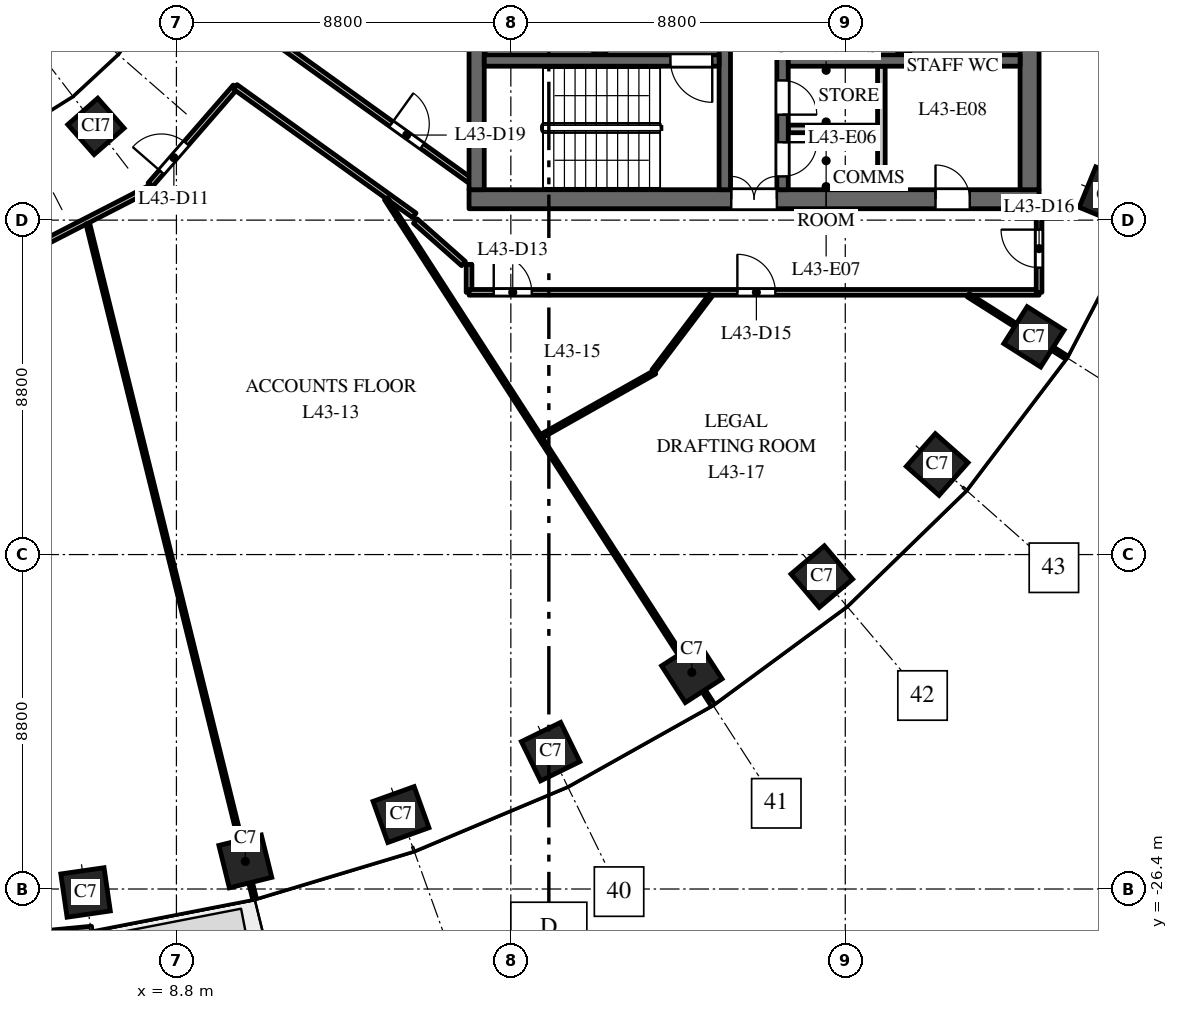
"""IFC4 building model, lengths in metres.
Left out: names, types, materials, properties, quantities, classifications, styles, units other than length and angle.
Written with IfcOpenShell. Run it as: python <this file> out.ifc"""

import sys

from ifc_helpers import new_model, si_unit, direction, frame, frame_2d, origin, origin_2d, place, context, subcontext, project, spatial, rectangle, extrude, element, fill, save


model = new_model("IFC4")
c1 = context("Model", 3, precision=1e-05, world=origin(), true_north=direction((0.0, 1.0)))
c2 = subcontext(c1, "Body", "Model", "MODEL_VIEW")
j1 = project(units=[si_unit("LENGTHUNIT", "METRE"), si_unit("PLANEANGLEUNIT", "RADIAN")], contexts=[c1])
p1 = place(None, origin())
s1 = spatial("IfcSite", under=j1, at=p1, CompositionType="ELEMENT")
p2 = place(p1, origin())
s2 = spatial("IfcBuilding", under=s1, at=p2, CompositionType="ELEMENT")
p3 = place(p2, frame((0.0, 0.0, 186.0)))
s3 = spatial("IfcBuildingStorey", under=s2, at=p3, CompositionType="ELEMENT", Elevation=186.0)
for number, where, z_axis, x_axis in (
    (1, (6.409, -26.491, 0.0), (0.0, 0.0, 1.0), (0.99, 0.143, 0.0)),
    (2, (10.613, -25.674, 0.0), (0.0, 0.0, 1.0), (0.971, 0.24, 0.0)),
    (3, (14.709, -24.441, 0.0), (0.0, 0.0, 1.0), (0.941, 0.338, 0.0)),
    (4, (18.646, -22.785, 0.0), (0.0, 0.0, 1.0), (0.898, 0.439, 0.0)),
    (5, (22.362, -20.7, 0.0), (0.0, 0.0, 1.0), (0.84, 0.542, 0.0)),
    (6, (25.783, -18.18, 0.0), (0.0, 0.0, 1.0), (0.763, 0.646, 0.0)),
    (7, (28.819, -15.23, 0.0), (0.0, 0.0, 1.0), (0.663, 0.749, 0.0)),
    (8, (31.365, -11.871, 0.0), (0.0, 0.0, 1.0), (0.535, 0.845, 0.0)),
    (9, (33.305, -8.149, 0.0), (0.0, 0.0, 1.0), (0.379, 0.925, 0.0)),
):
    element("IfcColumn", number, at=place(p3, frame(where, z_axis=z_axis, x_axis=x_axis)), inside=s3, PredefinedType="COLUMN", context=c2, shape_type="SweptSolid", body=[
        extrude(rectangle(XDim=1.15, YDim=1.15, at=origin_2d()), origin(), (0.0, 0.0, 1.0), 4.0),
    ])
p4 = place(p3, frame((6.682, -6.334, 0.0), z_axis=(0.0, 0.0, 1.0), x_axis=(0.75102249095, 0.660276622399, 0.0)))
e10 = element("IfcColumn", 10, at=p4, inside=s3, PredefinedType="COLUMN", context=c2, shape_type="SweptSolid", body=[
    extrude(rectangle(XDim=1.05, YDim=1.05, at=origin_2d()), origin(), (0.0, 0.0, 1.0), 4.0),
])
p5 = place(p3, frame((16.5, -8.25, 0.0), z_axis=(0.0, 0.0, 1.0), x_axis=(1.0, 0.0, 0.0)))
e11 = element("IfcWall", 11, at=p5, inside=s3, PredefinedType="SHEAR", context=c2, shape_type="SweptSolid", body=[
    extrude(rectangle(XDim=15.0, YDim=0.5, at=frame_2d((7.5, 0.0))), origin(), (0.0, 0.0, 1.0), 3.7),
])
p6 = place(p5, frame((6.9, 0.0, 0.0)))
e12 = element("IfcOpeningElement", 12, at=p6, cuts=e11, PredefinedType="OPENING", context=c2, shape_type="SweptSolid", body=[
    extrude(rectangle(XDim=1.2, YDim=2.1, at=frame_2d((0.6, 1.05))), frame((0.0, 0.26, 0.0), z_axis=(0.0, -1.0, 0.0), x_axis=(1.0, 0.0, 0.0)), (0.0, 0.0, 1.0), 0.52),
])
p7 = place(p5, frame((12.275, 0.0, 0.0)))
e13 = element("IfcOpeningElement", 13, at=p7, cuts=e11, PredefinedType="OPENING", context=c2, shape_type="SweptSolid", body=[
    extrude(rectangle(XDim=0.9, YDim=2.1, at=frame_2d((0.45, 1.05))), frame((0.0, 0.26, 0.0), z_axis=(0.0, -1.0, 0.0), x_axis=(1.0, 0.0, 0.0)), (0.0, 0.0, 1.0), 0.52),
])
p8 = place(p3, frame((27.95, -4.45, 0.0), z_axis=(0.0, 0.0, 1.0), x_axis=(0.0, 1.0, 0.0)))
e14 = element("IfcWall", 14, at=p8, inside=s3, PredefinedType="SHEAR", context=c2, shape_type="SweptSolid", body=[
    extrude(rectangle(XDim=8.9, YDim=0.3, at=frame_2d((4.45, 0.0))), origin(), (0.0, 0.0, 1.0), 3.7),
])
p9 = place(p3, frame((19.95, -4.45, 0.0), z_axis=(0.0, 0.0, 1.0), x_axis=(0.0, 1.0, 0.0)))
e15 = element("IfcWall", 15, at=p9, inside=s3, PredefinedType="SHEAR", context=c2, shape_type="SweptSolid", body=[
    extrude(rectangle(XDim=8.9, YDim=0.3, at=frame_2d((4.45, 0.0))), origin(), (0.0, 0.0, 1.0), 3.7),
])
p10 = place(p9, frame((0.775, 0.0, 0.0)))
e16 = element("IfcOpeningElement", 16, at=p10, cuts=e15, PredefinedType="OPENING", context=c2, shape_type="SweptSolid", body=[
    extrude(rectangle(XDim=1.2, YDim=2.1, at=frame_2d((0.6, 1.05))), frame((0.0, 0.16, 0.0), z_axis=(0.0, -1.0, 0.0), x_axis=(1.0, 0.0, 0.0)), (0.0, 0.0, 1.0), 0.32),
])
p11 = place(p9, frame((4.675, 0.0, 0.0)))
e17 = element("IfcOpeningElement", 17, at=p11, cuts=e15, PredefinedType="OPENING", context=c2, shape_type="SweptSolid", body=[
    extrude(rectangle(XDim=1.1, YDim=2.1, at=frame_2d((0.55, 1.05))), frame((0.0, 0.16, 0.0), z_axis=(0.0, -1.0, 0.0), x_axis=(1.0, 0.0, 0.0)), (0.0, 0.0, 1.0), 0.32),
])
p12 = place(p9, frame((7.25, 0.0, 0.0)))
e18 = element("IfcOpeningElement", 18, at=p12, cuts=e15, PredefinedType="OPENING", context=c2, shape_type="SweptSolid", body=[
    extrude(rectangle(XDim=1.1, YDim=2.1, at=frame_2d((0.55, 1.05))), frame((0.0, 0.16, 0.0), z_axis=(0.0, -1.0, 0.0), x_axis=(1.0, 0.0, 0.0)), (0.0, 0.0, 1.0), 0.32),
])
p13 = place(p3, frame((24.75, -8.0, 0.0), z_axis=(0.0, 0.0, 1.0), x_axis=(0.0, 1.0, 0.0)))
e19 = element("IfcWall", 19, at=p13, inside=s3, PredefinedType="SHEAR", context=c2, shape_type="SweptSolid", body=[
    extrude(rectangle(XDim=16.0, YDim=0.3, at=frame_2d((8.0, 0.0))), origin(), (0.0, 0.0, 1.0), 3.7),
])
p14 = place(p13, frame((4.425, 0.0, 0.0)))
e20 = element("IfcOpeningElement", 20, at=p14, cuts=e19, PredefinedType="OPENING", context=c2, shape_type="SweptSolid", body=[
    extrude(rectangle(XDim=1.1, YDim=2.1, at=frame_2d((0.55, 1.05))), frame((0.0, 0.16, 0.0), z_axis=(0.0, -1.0, 0.0), x_axis=(1.0, 0.0, 0.0)), (0.0, 0.0, 1.0), 0.32),
])
p15 = place(p13, frame((7.45, 0.0, 0.0)))
e21 = element("IfcOpeningElement", 21, at=p15, cuts=e19, PredefinedType="OPENING", context=c2, shape_type="SweptSolid", body=[
    extrude(rectangle(XDim=1.1, YDim=2.1, at=frame_2d((0.55, 1.05))), frame((0.0, 0.16, 0.0), z_axis=(0.0, -1.0, 0.0), x_axis=(1.0, 0.0, 0.0)), (0.0, 0.0, 1.0), 0.32),
])
p16 = place(p13, frame((10.475, 0.0, 0.0)))
e22 = element("IfcOpeningElement", 22, at=p16, cuts=e19, PredefinedType="OPENING", context=c2, shape_type="SweptSolid", body=[
    extrude(rectangle(XDim=1.1, YDim=2.1, at=frame_2d((0.55, 1.05))), frame((0.0, 0.16, 0.0), z_axis=(0.0, -1.0, 0.0), x_axis=(1.0, 0.0, 0.0)), (0.0, 0.0, 1.0), 0.32),
])
p17 = place(p13, frame((13.75, 0.0, 0.0)))
e23 = element("IfcOpeningElement", 23, at=p17, cuts=e19, PredefinedType="OPENING", context=c2, shape_type="SweptSolid", body=[
    extrude(rectangle(XDim=0.9, YDim=2.1, at=frame_2d((0.45, 1.05))), frame((0.0, 0.16, 0.0), z_axis=(0.0, -1.0, 0.0), x_axis=(1.0, 0.0, 0.0)), (0.0, 0.0, 1.0), 0.32),
])
p18 = place(p13, frame((1.975, 0.0, 0.0)))
e24 = element("IfcOpeningElement", 24, at=p18, cuts=e19, PredefinedType="OPENING", context=c2, shape_type="SweptSolid", body=[
    extrude(rectangle(XDim=0.9, YDim=2.1, at=frame_2d((0.45, 1.05))), frame((0.0, 0.16, 0.0), z_axis=(0.0, -1.0, 0.0), x_axis=(1.0, 0.0, 0.0)), (0.0, 0.0, 1.0), 0.32),
])
p19 = place(p13, frame((0.35, 0.0, 0.0)))
e25 = element("IfcOpeningElement", 25, at=p19, cuts=e19, PredefinedType="OPENING", context=c2, shape_type="SweptSolid", body=[
    extrude(rectangle(XDim=0.9, YDim=2.1, at=frame_2d((0.45, 1.05))), frame((0.0, 0.16, 0.0), z_axis=(0.0, -1.0, 0.0), x_axis=(1.0, 0.0, 0.0)), (0.0, 0.0, 1.0), 0.32),
])
p20 = place(p3, frame((16.7, -8.0, 0.0), z_axis=(0.0, 0.0, 1.0), x_axis=(0.0, 1.0, 0.0)))
e26 = element("IfcWall", 26, at=p20, inside=s3, PredefinedType="SHEAR", context=c2, shape_type="SweptSolid", body=[
    extrude(rectangle(XDim=16.0, YDim=0.4, at=frame_2d((8.0, 0.0))), origin(), (0.0, 0.0, 1.0), 3.7),
])
p21 = place(p3, frame((31.25, -8.0, 0.0), z_axis=(0.0, 0.0, 1.0), x_axis=(0.0, 1.0, 0.0)))
e27 = element("IfcWall", 27, at=p21, inside=s3, PredefinedType="SHEAR", context=c2, shape_type="SweptSolid", body=[
    extrude(rectangle(XDim=16.0, YDim=0.5, at=frame_2d((8.0, 0.0))), origin(), (0.0, 0.0, 1.0), 3.7),
])
p22 = place(p3, frame((27.35, -8.0, 0.0), z_axis=(0.0, 0.0, 1.0), x_axis=(0.0, 1.0, 0.0)))
e28 = element("IfcWall", 28, at=p22, inside=s3, PredefinedType="PARTITIONING", context=c2, shape_type="SweptSolid", body=[
    extrude(rectangle(XDim=3.25, YDim=0.2, at=frame_2d((1.625, 0.0))), origin(), (0.0, 0.0, 1.0), 3.7),
])
p23 = place(p3, frame((24.9, -6.4, 0.0), z_axis=(0.0, 0.0, 1.0), x_axis=(1.0, 0.0, 0.0)))
e29 = element("IfcWall", 29, at=p23, inside=s3, PredefinedType="PARTITIONING", context=c2, shape_type="SweptSolid", body=[
    extrude(rectangle(XDim=2.35, YDim=0.2, at=frame_2d((1.175, 0.0))), origin(), (0.0, 0.0, 1.0), 3.7),
])
p24 = place(p3, frame((24.9, -4.6, 0.0), z_axis=(0.0, 0.0, 1.0), x_axis=(1.0, 0.0, 0.0)))
e30 = element("IfcWall", 30, at=p24, inside=s3, PredefinedType="SHEAR", context=c2, shape_type="SweptSolid", body=[
    extrude(rectangle(XDim=6.1, YDim=0.3, at=frame_2d((3.05, 0.0))), origin(), (0.0, 0.0, 1.0), 3.7),
])
p25 = place(p3, frame((23.23, -8.0, 0.0), z_axis=(0.0, 0.0, 1.0), x_axis=(0.0, 1.0, 0.0)))
e31 = element("IfcWall", 31, at=p25, inside=s3, PredefinedType="SHEAR", context=c2, shape_type="SweptSolid", body=[
    extrude(rectangle(XDim=7.875, YDim=0.3, at=frame_2d((3.938, 0.0))), origin(), (0.0, 0.0, 1.0), 3.7),
])
p26 = place(p25, frame((5.15, 0.0, 0.0)))
e32 = element("IfcOpeningElement", 32, at=p26, cuts=e31, PredefinedType="OPENING", context=c2, shape_type="SweptSolid", body=[
    extrude(rectangle(XDim=1.1, YDim=2.1, at=frame_2d((0.55, 1.05))), frame((0.0, 0.16, 0.0), z_axis=(0.0, -1.0, 0.0), x_axis=(1.0, 0.0, 0.0)), (0.0, 0.0, 1.0), 0.32),
])
p27 = place(p3, frame((16.9, -4.6, 0.0), z_axis=(0.0, 0.0, 1.0), x_axis=(1.0, 0.0, 0.0)))
e33 = element("IfcWall", 33, at=p27, inside=s3, PredefinedType="SHEAR", context=c2, shape_type="SweptSolid", body=[
    extrude(rectangle(XDim=6.18, YDim=0.3, at=frame_2d((3.09, 0.0))), origin(), (0.0, 0.0, 1.0), 3.7),
])
p28 = place(p27, frame((4.9, 0.0, 0.0)))
e34 = element("IfcOpeningElement", 34, at=p28, cuts=e33, PredefinedType="OPENING", context=c2, shape_type="SweptSolid", body=[
    extrude(rectangle(XDim=1.1, YDim=2.1, at=frame_2d((0.55, 1.05))), frame((0.0, 0.16, 0.0), z_axis=(0.0, -1.0, 0.0), x_axis=(1.0, 0.0, 0.0)), (0.0, 0.0, 1.0), 0.32),
])
p29 = place(p3, frame((2.166, -27.875, 0.0), z_axis=(0.0, 0.0, 1.0), x_axis=(0.995473879823, 0.095035543824, 0.0)))
e35 = element("IfcWall", 35, at=p29, inside=s3, PredefinedType="STANDARD", context=c2, shape_type="SweptSolid", body=[
    extrude(rectangle(XDim=4.426, YDim=0.15, at=frame_2d((2.213, 0.0))), origin(), (0.0, 0.0, 1.0), 3.7),
])
p30 = place(p29, frame((1.713, 0.0, 0.0)))
e36 = element("IfcOpeningElement", 36, at=p30, cuts=e35, PredefinedType="OPENING", context=c2, shape_type="SweptSolid", body=[
    extrude(rectangle(XDim=1.0, YDim=2.4, at=frame_2d((0.5, 1.2))), frame((0.0, 0.085, 0.0), z_axis=(0.0, -1.0, 0.0), x_axis=(1.0, 0.0, 0.0)), (0.0, 0.0, 1.0), 0.17),
])
p31 = place(p3, frame((4.337, -9.896, 0.0), z_axis=(0.0, 0.0, 1.0), x_axis=(0.889382211946, 0.457164391739, 0.0)))
e37 = element("IfcWall", 37, at=p31, inside=s3, PredefinedType="PARTITIONING", context=c2, shape_type="SweptSolid", body=[
    extrude(rectangle(XDim=4.296, YDim=0.15, at=frame_2d((2.148, 0.0))), origin(), (0.0, 0.0, 1.0), 2.85),
])
p32 = place(p3, frame((6.467, -8.889, 0.0), z_axis=(0.0, 0.0, 1.0), x_axis=(0.239792865419, -0.970824073504, 0.0)))
e38 = element("IfcWall", 38, at=p32, inside=s3, PredefinedType="PARTITIONING", context=c2, shape_type="SweptSolid", body=[
    extrude(rectangle(XDim=18.291, YDim=0.1, at=frame_2d((9.146, 0.0))), origin(), (0.0, 0.0, 1.0), 2.85),
])
p33 = place(p3, frame((8.111, -7.871, 0.0), z_axis=(0.0, 0.0, 1.0), x_axis=(0.656293818527, 0.754505416656, 0.0)))
e39 = element("IfcWall", 39, at=p33, inside=s3, PredefinedType="PARTITIONING", context=c2, shape_type="SweptSolid", body=[
    extrude(rectangle(XDim=3.413, YDim=0.15, at=frame_2d((1.707, 0.0))), origin(), (0.0, 0.0, 1.0), 2.75),
])
p34 = place(p33, frame((0.447, 0.0, 0.0)))
e40 = element("IfcOpeningElement", 40, at=p34, cuts=e39, PredefinedType="OPENING", context=c2, shape_type="SweptSolid", body=[
    extrude(rectangle(XDim=1.0, YDim=2.1, at=frame_2d((0.5, 1.05))), frame((0.0, 0.085, 0.0), z_axis=(0.0, -1.0, 0.0), x_axis=(1.0, 0.0, 0.0)), (0.0, 0.0, 1.0), 0.17),
])
p35 = place(p3, frame((10.351, -5.296, 0.0), z_axis=(0.0, 0.0, 1.0), x_axis=(0.812494026232, -0.582969516645, 0.0)))
e41 = element("IfcWall", 41, at=p35, inside=s3, PredefinedType="PARTITIONING", context=c2, shape_type="SweptSolid", body=[
    extrude(rectangle(XDim=5.798, YDim=0.15, at=frame_2d((2.899, 0.0))), origin(), (0.0, 0.0, 1.0), 2.75),
])
p36 = place(p3, frame((11.203, -3.938, 0.0), z_axis=(0.0, 0.0, 1.0), x_axis=(0.812471543061, -0.583000850528, 0.0)))
e42 = element("IfcWall", 42, at=p36, inside=s3, PredefinedType="PARTITIONING", context=c2, shape_type="SweptSolid", body=[
    extrude(rectangle(XDim=6.52, YDim=0.15, at=frame_2d((3.26, 0.0))), origin(), (0.0, 0.0, 1.0), 3.7),
])
p37 = place(p36, frame((4.0, 0.0, 0.0)))
e43 = element("IfcOpeningElement", 43, at=p37, cuts=e42, PredefinedType="OPENING", context=c2, shape_type="SweptSolid", body=[
    extrude(rectangle(XDim=1.0, YDim=2.1, at=frame_2d((0.5, 1.05))), frame((0.0, 0.085, 0.0), z_axis=(0.0, -1.0, 0.0), x_axis=(1.0, 0.0, 0.0)), (0.0, 0.0, 1.0), 0.17),
])
p38 = place(p3, frame((14.317, -8.236, 0.0), z_axis=(0.0, 0.0, 1.0), x_axis=(0.542334368531, -0.840162741801, 0.0)))
e44 = element("IfcWall", 44, at=p38, inside=s3, PredefinedType="PARTITIONING", context=c2, shape_type="SweptSolid", body=[
    extrude(rectangle(XDim=15.837, YDim=0.1, at=frame_2d((7.919, 0.0))), origin(), (0.0, 0.0, 1.0), 3.7),
])
p39 = place(p3, frame((16.5, -10.7, 0.0), z_axis=(0.0, 0.0, 1.0), x_axis=(0.0, 1.0, 0.0)))
e45 = element("IfcWall", 45, at=p39, inside=s3, PredefinedType="PARTITIONING", context=c2, shape_type="SweptSolid", body=[
    extrude(rectangle(XDim=0.736, YDim=0.15, at=frame_2d((0.368, 0.0))), origin(), (0.0, 0.0, 1.0), 3.7),
])
p40 = place(p3, frame((16.5, -10.7, 0.0), z_axis=(0.0, 0.0, 1.0), x_axis=(1.0, 0.0, 0.0)))
e46 = element("IfcWall", 46, at=p40, inside=s3, PredefinedType="PARTITIONING", context=c2, shape_type="SweptSolid", body=[
    extrude(rectangle(XDim=15.0, YDim=0.15, at=frame_2d((7.5, 0.0))), origin(), (0.0, 0.0, 1.0), 2.75),
])
p41 = place(p40, frame((0.65, 0.0, 0.0)))
e47 = element("IfcOpeningElement", 47, at=p41, cuts=e46, PredefinedType="OPENING", context=c2, shape_type="SweptSolid", body=[
    extrude(rectangle(XDim=1.0, YDim=2.1, at=frame_2d((0.5, 1.05))), frame((0.0, 0.085, 0.0), z_axis=(0.0, -1.0, 0.0), x_axis=(1.0, 0.0, 0.0)), (0.0, 0.0, 1.0), 0.17),
])
p42 = place(p40, frame((7.061, 0.0, 0.0)))
e48 = element("IfcOpeningElement", 48, at=p42, cuts=e46, PredefinedType="OPENING", context=c2, shape_type="SweptSolid", body=[
    extrude(rectangle(XDim=1.0, YDim=2.1, at=frame_2d((0.5, 1.05))), frame((0.0, 0.085, 0.0), z_axis=(0.0, -1.0, 0.0), x_axis=(1.0, 0.0, 0.0)), (0.0, 0.0, 1.0), 0.17),
])
p43 = place(p3, frame((18.409, -14.482, 0.0), z_axis=(0.0, 0.0, 1.0), x_axis=(0.871167200766, 0.490986464487, 0.0)))
e49 = element("IfcWall", 49, at=p43, inside=s3, PredefinedType="PARTITIONING", context=c2, shape_type="SweptSolid", body=[
    extrude(rectangle(XDim=3.419, YDim=0.1, at=frame_2d((1.71, 0.0))), origin(), (0.0, 0.0, 1.0), 3.7),
])
p44 = place(p3, frame((21.355, -12.765, 0.0), z_axis=(0.0, 0.0, 1.0), x_axis=(0.603287715996, 0.797523624558, 0.0)))
e50 = element("IfcWall", 50, at=p44, inside=s3, PredefinedType="PARTITIONING", context=c2, shape_type="SweptSolid", body=[
    extrude(rectangle(XDim=2.491, YDim=0.1, at=frame_2d((1.246, 0.0))), origin(), (0.0, 0.0, 1.0), 2.75),
])
p45 = place(p3, frame((29.637, -10.777, 0.0), z_axis=(0.0, 0.0, 1.0), x_axis=(0.844810627195, -0.535065420467, 0.0)))
e51 = element("IfcWall", 51, at=p45, inside=s3, PredefinedType="PARTITIONING", context=c2, shape_type="SweptSolid", body=[
    extrude(rectangle(XDim=3.048, YDim=0.1, at=frame_2d((1.524, 0.0))), origin(), (0.0, 0.0, 1.0), 2.9),
])
p46 = place(p3, frame((31.5, -10.7, 0.0), z_axis=(0.0, 0.0, 1.0), x_axis=(0.0, 1.0, 0.0)))
e52 = element("IfcWall", 52, at=p46, inside=s3, PredefinedType="PARTITIONING", context=c2, shape_type="SweptSolid", body=[
    extrude(rectangle(XDim=2.2, YDim=0.15, at=frame_2d((1.1, 0.0))), origin(), (0.0, 0.0, 1.0), 2.9),
])
p47 = place(p46, frame((0.65, 0.0, 0.0)))
e53 = element("IfcOpeningElement", 53, at=p47, cuts=e52, PredefinedType="OPENING", context=c2, shape_type="SweptSolid", body=[
    extrude(rectangle(XDim=1.0, YDim=2.1, at=frame_2d((0.5, 1.05))), frame((0.0, 0.085, 0.0), z_axis=(0.0, -1.0, 0.0), x_axis=(1.0, 0.0, 0.0)), (0.0, 0.0, 1.0), 0.17),
])
p48 = place(p3, frame((16.352, -9.942, 0.0), z_axis=(0.0, 0.0, 1.0), x_axis=(-0.749107006374, 0.662449011624, 0.0)))
e54 = element("IfcWall", 54, at=p48, inside=s3, PredefinedType="PARTITIONING", context=c2, shape_type="SweptSolid", body=[
    extrude(rectangle(XDim=1.688, YDim=0.15, at=frame_2d((0.844, 0.0))), origin(), (0.0, 0.0, 1.0), 3.7),
])
p49 = place(p28, origin())
e55 = element("IfcDoor", 55, at=p49, inside=s3, OperationType="SINGLE_SWING_RIGHT", PredefinedType="DOOR", context=c2, shape_type="SweptSolid", body=[
    extrude(rectangle(XDim=1.1, YDim=2.1, at=frame_2d((0.55, 1.05))), frame((0.0, 0.025, 0.0), z_axis=(0.0, -1.0, 0.0), x_axis=(1.0, 0.0, 0.0)), (0.0, 0.0, 1.0), 0.05),
])
fill(e34, e55)
p50 = place(p6, origin())
e56 = element("IfcDoor", 56, at=p50, inside=s3, OperationType="DOUBLE_DOOR_DOUBLE_SWING", PredefinedType="DOOR", context=c2, shape_type="SweptSolid", body=[
    extrude(rectangle(XDim=1.2, YDim=2.1, at=frame_2d((0.6, 1.05))), frame((0.0, 0.025, 0.0), z_axis=(0.0, -1.0, 0.0), x_axis=(1.0, 0.0, 0.0)), (0.0, 0.0, 1.0), 0.05),
])
fill(e12, e56)
p51 = place(p18, origin())
e57 = element("IfcDoor", 57, at=p51, inside=s3, OperationType="SINGLE_SWING_LEFT", PredefinedType="DOOR", context=c2, shape_type="SweptSolid", body=[
    extrude(rectangle(XDim=0.9, YDim=2.1, at=frame_2d((0.45, 1.05))), frame((0.0, 0.025, 0.0), z_axis=(0.0, -1.0, 0.0), x_axis=(1.0, 0.0, 0.0)), (0.0, 0.0, 1.0), 0.05),
])
fill(e24, e57)
p52 = place(p19, origin())
e58 = element("IfcDoor", 58, at=p52, inside=s3, OperationType="SINGLE_SWING_RIGHT", PredefinedType="DOOR", context=c2, shape_type="SweptSolid", body=[
    extrude(rectangle(XDim=0.9, YDim=2.1, at=frame_2d((0.45, 1.05))), frame((0.0, 0.025, 0.0), z_axis=(0.0, -1.0, 0.0), x_axis=(1.0, 0.0, 0.0)), (0.0, 0.0, 1.0), 0.05),
])
fill(e25, e58)
p53 = place(p7, origin())
e59 = element("IfcDoor", 59, at=p53, inside=s3, OperationType="SINGLE_SWING_RIGHT", PredefinedType="DOOR", context=c2, shape_type="SweptSolid", body=[
    extrude(rectangle(XDim=0.9, YDim=2.1, at=frame_2d((0.45, 1.05))), frame((0.0, 0.025, 0.0), z_axis=(0.0, -1.0, 0.0), x_axis=(1.0, 0.0, 0.0)), (0.0, 0.0, 1.0), 0.05),
])
fill(e13, e59)
p54 = place(p34, origin())
e60 = element("IfcDoor", 60, at=p54, inside=s3, OperationType="SINGLE_SWING_LEFT", PredefinedType="DOOR", context=c2, shape_type="SweptSolid", body=[
    extrude(rectangle(XDim=1.0, YDim=2.1, at=frame_2d((0.5, 1.05))), frame((0.0, 0.025, 0.0), z_axis=(0.0, -1.0, 0.0), x_axis=(1.0, 0.0, 0.0)), (0.0, 0.0, 1.0), 0.05),
])
fill(e40, e60)
p55 = place(p41, origin())
e61 = element("IfcDoor", 61, at=p55, inside=s3, OperationType="SINGLE_SWING_LEFT", PredefinedType="DOOR", context=c2, shape_type="SweptSolid", body=[
    extrude(rectangle(XDim=1.0, YDim=2.1, at=frame_2d((0.5, 1.05))), frame((0.0, 0.025, 0.0), z_axis=(0.0, -1.0, 0.0), x_axis=(1.0, 0.0, 0.0)), (0.0, 0.0, 1.0), 0.05),
])
fill(e47, e61)
p56 = place(p42, origin())
e62 = element("IfcDoor", 62, at=p56, inside=s3, OperationType="SINGLE_SWING_LEFT", PredefinedType="DOOR", context=c2, shape_type="SweptSolid", body=[
    extrude(rectangle(XDim=1.0, YDim=2.1, at=frame_2d((0.5, 1.05))), frame((0.0, 0.025, 0.0), z_axis=(0.0, -1.0, 0.0), x_axis=(1.0, 0.0, 0.0)), (0.0, 0.0, 1.0), 0.05),
])
fill(e48, e62)
p57 = place(p47, origin())
e63 = element("IfcDoor", 63, at=p57, inside=s3, OperationType="SINGLE_SWING_RIGHT", PredefinedType="DOOR", context=c2, shape_type="SweptSolid", body=[
    extrude(rectangle(XDim=1.0, YDim=2.1, at=frame_2d((0.5, 1.05))), frame((0.0, 0.025, 0.0), z_axis=(0.0, -1.0, 0.0), x_axis=(1.0, 0.0, 0.0)), (0.0, 0.0, 1.0), 0.05),
])
fill(e53, e63)
p58 = place(p37, origin())
e64 = element("IfcDoor", 64, at=p58, inside=s3, OperationType="SINGLE_SWING_LEFT", PredefinedType="DOOR", context=c2, shape_type="SweptSolid", body=[
    extrude(rectangle(XDim=1.0, YDim=2.1, at=frame_2d((0.5, 1.05))), frame((0.0, 0.025, 0.0), z_axis=(0.0, -1.0, 0.0), x_axis=(1.0, 0.0, 0.0)), (0.0, 0.0, 1.0), 0.05),
])
fill(e43, e64)
save(model, sys.argv[1])
